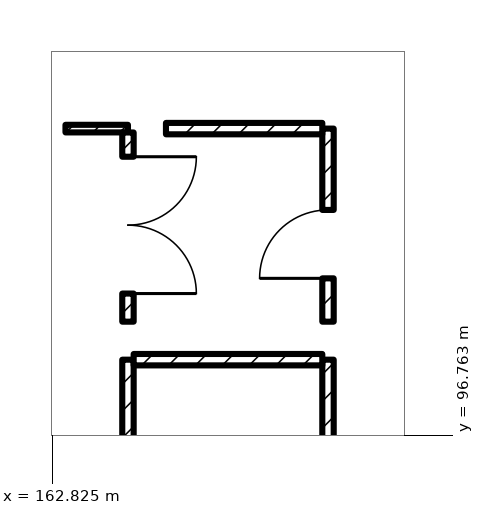
"""IFC4 building model, lengths in metres.
Left out: names, types, materials, properties, quantities, classifications, styles, units other than length and angle.
Written with IfcOpenShell. Run it as: python <this file> out.ifc"""

import sys

from ifc_helpers import new_model, si_unit, direction, frame, frame_2d, origin, place, context, subcontext, project, spatial, rectangle, extrude, element, fill, save


model = new_model("IFC4")
c1 = context("Model", 3, precision=1e-05, world=origin(), true_north=direction((0.0, 1.0)))
c2 = subcontext(c1, "Body", "Model", "MODEL_VIEW")
j1 = project(units=[si_unit("LENGTHUNIT", "METRE"), si_unit("PLANEANGLEUNIT", "RADIAN")], contexts=[c1])
p1 = place(None, origin())
s1 = spatial("IfcSite", under=j1, at=p1, CompositionType="ELEMENT")
p2 = place(p1, origin())
s2 = spatial("IfcBuilding", under=s1, at=p2, CompositionType="ELEMENT")
p3 = place(p2, frame((0.0, 0.0, 6.0)))
s3 = spatial("IfcBuildingStorey", under=s2, at=p3, CompositionType="ELEMENT", Elevation=6.0)
p4 = place(p3, frame((163.0, 100.8, 0.0), z_axis=(0.0, 0.0, 1.0), x_axis=(1.0, 0.0, 0.0)))
e1 = element("IfcWall", 1, at=p4, inside=s3, PredefinedType="PARTITIONING", context=c2, shape_type="SweptSolid", body=[
    extrude(rectangle(XDim=0.822, YDim=0.1, at=frame_2d((0.411, 0.0))), origin(), (0.0, 0.0, 1.0), 4.45),
])
p5 = place(p3, frame((163.822, 97.76, 0.0), z_axis=(0.0, 0.0, 1.0), x_axis=(0.0, -1.0, 0.0)))
e2 = element("IfcWall", 2, at=p5, inside=s3, PredefinedType="PARTITIONING", context=c2, shape_type="SweptSolid", body=[
    extrude(rectangle(XDim=19.56, YDim=0.15, at=frame_2d((9.78, 0.0))), origin(), (0.0, 0.0, 1.0), 4.45),
])
p6 = place(p5, frame((8.98, 0.0, 0.0)))
e3 = element("IfcOpeningElement", 3, at=p6, cuts=e2, PredefinedType="OPENING", context=c2, shape_type="SweptSolid", body=[
    extrude(rectangle(XDim=1.8, YDim=2.1, at=frame_2d((0.9, 1.05))), frame((0.0, 0.087, 0.0), z_axis=(0.0, -1.0, 0.0), x_axis=(1.0, 0.0, 0.0)), (0.0, 0.0, 1.0), 0.174),
])
p7 = place(p3, frame((166.454, 78.2, 0.0), z_axis=(0.0, 0.0, 1.0), x_axis=(0.0, 1.0, 0.0)))
e4 = element("IfcWall", 4, at=p7, inside=s3, PredefinedType="PARTITIONING", context=c2, shape_type="SweptSolid", body=[
    extrude(rectangle(XDim=19.56, YDim=0.15, at=frame_2d((9.78, 0.0))), origin(), (0.0, 0.0, 1.0), 4.45),
])
p8 = place(p7, frame((9.23, 0.0, 0.0)))
e5 = element("IfcOpeningElement", 5, at=p8, cuts=e4, PredefinedType="OPENING", context=c2, shape_type="SweptSolid", body=[
    extrude(rectangle(XDim=0.9, YDim=2.1, at=frame_2d((0.45, 1.05))), frame((0.0, 0.087, 0.0), z_axis=(0.0, -1.0, 0.0), x_axis=(1.0, 0.0, 0.0)), (0.0, 0.0, 1.0), 0.174),
])
p9 = place(p3, frame((163.822, 100.749, 0.0), z_axis=(0.0, 0.0, 1.0), x_axis=(0.0, -1.0, 0.0)))
e6 = element("IfcWall", 6, at=p9, inside=s3, PredefinedType="PARTITIONING", context=c2, shape_type="SweptSolid", body=[
    extrude(rectangle(XDim=2.489, YDim=0.15, at=frame_2d((1.245, 0.0))), origin(), (0.0, 0.0, 1.0), 4.45),
])
p10 = place(p9, frame((0.319, 0.0, 0.0)))
e7 = element("IfcOpeningElement", 7, at=p10, cuts=e6, PredefinedType="OPENING", context=c2, shape_type="SweptSolid", body=[
    extrude(rectangle(XDim=1.8, YDim=2.1, at=frame_2d((0.9, 1.05))), frame((0.0, 0.087, 0.0), z_axis=(0.0, -1.0, 0.0), x_axis=(1.0, 0.0, 0.0)), (0.0, 0.0, 1.0), 0.174),
])
p11 = place(p3, frame((166.454, 98.26, 0.0), z_axis=(0.0, 0.0, 1.0), x_axis=(0.0, 1.0, 0.0)))
e8 = element("IfcWall", 8, at=p11, inside=s3, PredefinedType="PARTITIONING", context=c2, shape_type="SweptSolid", body=[
    extrude(rectangle(XDim=2.54, YDim=0.15, at=frame_2d((1.27, 0.0))), origin(), (0.0, 0.0, 1.0), 4.45),
])
p12 = place(p11, frame((0.57, 0.0, 0.0)))
e9 = element("IfcOpeningElement", 9, at=p12, cuts=e8, PredefinedType="OPENING", context=c2, shape_type="SweptSolid", body=[
    extrude(rectangle(XDim=0.9, YDim=2.1, at=frame_2d((0.45, 1.05))), frame((0.0, 0.087, 0.0), z_axis=(0.0, -1.0, 0.0), x_axis=(1.0, 0.0, 0.0)), (0.0, 0.0, 1.0), 0.174),
])
p13 = place(p3, frame((166.379, 97.76, 0.0), z_axis=(0.0, 0.0, 1.0), x_axis=(-1.0, 0.0, 0.0)))
e10 = element("IfcWall", 10, at=p13, inside=s3, PredefinedType="PARTITIONING", context=c2, shape_type="SweptSolid", body=[
    extrude(rectangle(XDim=2.482, YDim=0.15, at=frame_2d((1.241, 0.0))), origin(), (0.0, 0.0, 1.0), 4.45),
])
p14 = place(p3, frame((166.379, 100.8, 0.0), z_axis=(0.0, 0.0, 1.0), x_axis=(-1.0, 0.0, 0.0)))
e11 = element("IfcWall", 11, at=p14, inside=s3, PredefinedType="PARTITIONING", context=c2, shape_type="SweptSolid", body=[
    extrude(rectangle(XDim=2.057, YDim=0.15, at=frame_2d((1.028, 0.0))), origin(), (0.0, 0.0, 1.0), 4.45),
])
p15 = place(p10, origin())
e12 = element("IfcDoor", 12, at=p15, inside=s3, OperationType="DOUBLE_DOOR_SINGLE_SWING", PredefinedType="DOOR", context=c2, shape_type="SweptSolid", body=[
    extrude(rectangle(XDim=1.8, YDim=2.1, at=frame_2d((0.9, 1.05))), frame((0.0, 0.025, 0.0), z_axis=(0.0, -1.0, 0.0), x_axis=(1.0, 0.0, 0.0)), (0.0, 0.0, 1.0), 0.05),
])
fill(e7, e12)
p16 = place(p12, origin())
e13 = element("IfcDoor", 13, at=p16, inside=s3, OperationType="SINGLE_SWING_LEFT", PredefinedType="DOOR", context=c2, shape_type="SweptSolid", body=[
    extrude(rectangle(XDim=0.9, YDim=2.1, at=frame_2d((0.45, 1.05))), frame((0.0, 0.025, 0.0), z_axis=(0.0, -1.0, 0.0), x_axis=(1.0, 0.0, 0.0)), (0.0, 0.0, 1.0), 0.05),
])
fill(e9, e13)
save(model, sys.argv[1])
